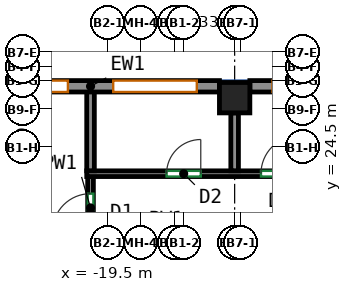
"""IFC4 building model, lengths in metres.
Left out: names, types, materials, properties, quantities, classifications, styles, units other than length and angle.
Written with IfcOpenShell. Run it as: python <this file> out.ifc"""

import sys

from ifc_helpers import new_model, si_unit, direction, frame, frame_2d, origin, origin_2d, place, context, subcontext, project, spatial, rectangle, extrude, source, transform, mapped, element, fill, save


model = new_model("IFC4")
c1 = context("Model", 3, precision=1e-05, world=origin(), true_north=direction((0.0, 1.0)))
c2 = subcontext(c1, "Body", "Model", "MODEL_VIEW")
j1 = project(units=[si_unit("LENGTHUNIT", "METRE"), si_unit("PLANEANGLEUNIT", "RADIAN")], contexts=[c1])
p1 = place(None, origin())
s1 = spatial("IfcSite", under=j1, at=p1, CompositionType="ELEMENT")
p2 = place(p1, origin())
s2 = spatial("IfcBuilding", under=s1, at=p2, CompositionType="ELEMENT")
p3 = place(p2, frame((0.0, 0.0, 171.9)))
s3 = spatial("IfcBuildingStorey", under=s2, at=p3, CompositionType="ELEMENT", Elevation=171.9)
m1 = source(origin(), c2, "Body", "SweptSolid", [
    extrude(rectangle(XDim=0.8, YDim=0.8, at=origin_2d()), origin(), (0.0, 0.0, 1.0), 3.12),
])
p4 = place(p3, frame((-16.167, 25.8, 0.0), z_axis=(0.0, 0.0, 1.0), x_axis=(1.0, 0.0, 0.0)))
e1 = element("IfcColumn", 1, at=p4, inside=s3, PredefinedType="COLUMN", context=c2, shape_type="MappedRepresentation", body=[
    mapped(m1, transform((0.0, 0.0, 0.0))),
])
m2 = source(origin(), c2, "Body", "SweptSolid", [
    extrude(rectangle(XDim=6.783, YDim=0.3, at=frame_2d((3.392, 0.0))), origin(), (0.0, 0.0, 1.0), 3.12),
])
p5 = place(p3, frame((-8.983, 26.1, 0.0), z_axis=(0.0, 0.0, 1.0), x_axis=(-1.0, 0.0, 0.0)))
e2 = element("IfcWall", 2, at=p5, inside=s3, PredefinedType="SOLIDWALL", context=c2, shape_type="MappedRepresentation", body=[
    mapped(m2, transform((0.0, 0.0, 0.0))),
])
p6 = place(p5, frame((0.596, 0.0, 0.85)))
e3 = element("IfcOpeningElement", 3, at=p6, cuts=e2, PredefinedType="OPENING", context=c2, shape_type="SweptSolid", body=[
    extrude(rectangle(XDim=2.2, YDim=1.95, at=frame_2d((1.1, 0.975))), frame((0.0, 0.16, 0.0), z_axis=(0.0, -1.0, 0.0), x_axis=(1.0, 0.0, 0.0)), (0.0, 0.0, 1.0), 0.32),
])
p7 = place(p5, frame((3.988, 0.0, 0.85)))
e4 = element("IfcOpeningElement", 4, at=p7, cuts=e2, PredefinedType="OPENING", context=c2, shape_type="SweptSolid", body=[
    extrude(rectangle(XDim=2.2, YDim=1.95, at=frame_2d((1.1, 0.975))), frame((0.0, 0.16, 0.0), z_axis=(0.0, -1.0, 0.0), x_axis=(1.0, 0.0, 0.0)), (0.0, 0.0, 1.0), 0.32),
])
m3 = source(origin(), c2, "Body", "SweptSolid", [
    extrude(rectangle(XDim=6.783, YDim=0.3, at=frame_2d((3.392, 0.0))), origin(), (0.0, 0.0, 1.0), 3.12),
])
p8 = place(p3, frame((-16.567, 26.1, 0.0), z_axis=(0.0, 0.0, 1.0), x_axis=(-1.0, 0.0, 0.0)))
e5 = element("IfcWall", 5, at=p8, inside=s3, PredefinedType="SOLIDWALL", context=c2, shape_type="MappedRepresentation", body=[
    mapped(m3, transform((0.0, 0.0, 0.0))),
])
p9 = place(p8, frame((0.596, 0.0, 0.85)))
e6 = element("IfcOpeningElement", 6, at=p9, cuts=e5, PredefinedType="OPENING", context=c2, shape_type="SweptSolid", body=[
    extrude(rectangle(XDim=2.2, YDim=1.95, at=frame_2d((1.1, 0.975))), frame((0.0, 0.16, 0.0), z_axis=(0.0, -1.0, 0.0), x_axis=(1.0, 0.0, 0.0)), (0.0, 0.0, 1.0), 0.32),
])
p10 = place(p8, frame((3.988, 0.0, 0.85)))
e7 = element("IfcOpeningElement", 7, at=p10, cuts=e5, PredefinedType="OPENING", context=c2, shape_type="SweptSolid", body=[
    extrude(rectangle(XDim=2.2, YDim=1.95, at=frame_2d((1.1, 0.975))), frame((0.0, 0.16, 0.0), z_axis=(0.0, -1.0, 0.0), x_axis=(1.0, 0.0, 0.0)), (0.0, 0.0, 1.0), 0.32),
])
p11 = place(p3, frame((-19.959, 22.075, 0.0), z_axis=(0.0, 0.0, 1.0), x_axis=(0.0, 1.0, 0.0)))
e8 = element("IfcWall", 8, at=p11, inside=s3, PredefinedType="PARTITIONING", context=c2, shape_type="SweptSolid", body=[
    extrude(rectangle(XDim=1.65, YDim=0.15, at=frame_2d((0.825, 0.0))), origin(), (0.0, 0.0, 1.0), 3.12),
])
p12 = place(p11, frame((0.2, 0.0, 0.0)))
e9 = element("IfcOpeningElement", 9, at=p12, cuts=e8, PredefinedType="OPENING", context=c2, shape_type="SweptSolid", body=[
    extrude(rectangle(XDim=1.0, YDim=2.1, at=frame_2d((0.5, 1.05))), frame((0.0, 0.085, 0.0), z_axis=(0.0, -1.0, 0.0), x_axis=(1.0, 0.0, 0.0)), (0.0, 0.0, 1.0), 0.17),
])
p13 = place(p3, frame((-20.059, 23.8, 0.0), z_axis=(0.0, 0.0, 1.0), x_axis=(1.0, 0.0, 0.0)))
e10 = element("IfcWall", 10, at=p13, inside=s3, PredefinedType="PARTITIONING", context=c2, shape_type="SweptSolid", body=[
    extrude(rectangle(XDim=41.909, YDim=0.15, at=frame_2d((20.955, 0.0))), origin(), (0.0, 0.0, 1.0), 3.12),
])
p14 = place(p13, frame((2.101, 0.0, 0.0)))
e11 = element("IfcOpeningElement", 11, at=p14, cuts=e10, PredefinedType="OPENING", context=c2, shape_type="SweptSolid", body=[
    extrude(rectangle(XDim=0.9, YDim=2.1, at=frame_2d((0.45, 1.05))), frame((0.0, 0.085, 0.0), z_axis=(0.0, -1.0, 0.0), x_axis=(1.0, 0.0, 0.0)), (0.0, 0.0, 1.0), 0.17),
])
p15 = place(p13, frame((4.585, 0.0, 0.0)))
e12 = element("IfcOpeningElement", 12, at=p15, cuts=e10, PredefinedType="OPENING", context=c2, shape_type="SweptSolid", body=[
    extrude(rectangle(XDim=1.0, YDim=2.1, at=frame_2d((0.5, 1.05))), frame((0.0, 0.085, 0.0), z_axis=(0.0, -1.0, 0.0), x_axis=(1.0, 0.0, 0.0)), (0.0, 0.0, 1.0), 0.17),
])
p16 = place(p13, frame((8.175, 0.0, 0.0)))
e13 = element("IfcOpeningElement", 13, at=p16, cuts=e10, PredefinedType="OPENING", context=c2, shape_type="SweptSolid", body=[
    extrude(rectangle(XDim=0.9, YDim=2.1, at=frame_2d((0.45, 1.05))), frame((0.0, 0.085, 0.0), z_axis=(0.0, -1.0, 0.0), x_axis=(1.0, 0.0, 0.0)), (0.0, 0.0, 1.0), 0.17),
])
p17 = place(p13, frame((13.173, 0.0, 0.0)))
e14 = element("IfcOpeningElement", 14, at=p17, cuts=e10, PredefinedType="OPENING", context=c2, shape_type="SweptSolid", body=[
    extrude(rectangle(XDim=1.0, YDim=2.1, at=frame_2d((0.5, 1.05))), frame((0.0, 0.085, 0.0), z_axis=(0.0, -1.0, 0.0), x_axis=(1.0, 0.0, 0.0)), (0.0, 0.0, 1.0), 0.17),
])
p18 = place(p13, frame((15.658, 0.0, 0.0)))
e15 = element("IfcOpeningElement", 15, at=p18, cuts=e10, PredefinedType="OPENING", context=c2, shape_type="SweptSolid", body=[
    extrude(rectangle(XDim=0.9, YDim=2.1, at=frame_2d((0.45, 1.05))), frame((0.0, 0.085, 0.0), z_axis=(0.0, -1.0, 0.0), x_axis=(1.0, 0.0, 0.0)), (0.0, 0.0, 1.0), 0.17),
])
p19 = place(p13, frame((21.315, 0.0, 0.0)))
e16 = element("IfcOpeningElement", 16, at=p19, cuts=e10, PredefinedType="OPENING", context=c2, shape_type="SweptSolid", body=[
    extrude(rectangle(XDim=0.9, YDim=2.1, at=frame_2d((0.45, 1.05))), frame((0.0, 0.085, 0.0), z_axis=(0.0, -1.0, 0.0), x_axis=(1.0, 0.0, 0.0)), (0.0, 0.0, 1.0), 0.17),
])
p20 = place(p13, frame((24.625, 0.0, 0.0)))
e17 = element("IfcOpeningElement", 17, at=p20, cuts=e10, PredefinedType="OPENING", context=c2, shape_type="SweptSolid", body=[
    extrude(rectangle(XDim=1.0, YDim=2.1, at=frame_2d((0.5, 1.05))), frame((0.0, 0.085, 0.0), z_axis=(0.0, -1.0, 0.0), x_axis=(1.0, 0.0, 0.0)), (0.0, 0.0, 1.0), 0.17),
])
p21 = place(p13, frame((29.043, 0.0, 0.0)))
e18 = element("IfcOpeningElement", 18, at=p21, cuts=e10, PredefinedType="OPENING", context=c2, shape_type="SweptSolid", body=[
    extrude(rectangle(XDim=0.9, YDim=2.1, at=frame_2d((0.45, 1.05))), frame((0.0, 0.085, 0.0), z_axis=(0.0, -1.0, 0.0), x_axis=(1.0, 0.0, 0.0)), (0.0, 0.0, 1.0), 0.17),
])
p22 = place(p13, frame((32.735, 0.0, 0.0)))
e19 = element("IfcOpeningElement", 19, at=p22, cuts=e10, PredefinedType="OPENING", context=c2, shape_type="SweptSolid", body=[
    extrude(rectangle(XDim=1.0, YDim=2.1, at=frame_2d((0.5, 1.05))), frame((0.0, 0.085, 0.0), z_axis=(0.0, -1.0, 0.0), x_axis=(1.0, 0.0, 0.0)), (0.0, 0.0, 1.0), 0.17),
])
p23 = place(p13, frame((36.627, 0.0, 0.0)))
e20 = element("IfcOpeningElement", 20, at=p23, cuts=e10, PredefinedType="OPENING", context=c2, shape_type="SweptSolid", body=[
    extrude(rectangle(XDim=0.9, YDim=2.1, at=frame_2d((0.45, 1.05))), frame((0.0, 0.085, 0.0), z_axis=(0.0, -1.0, 0.0), x_axis=(1.0, 0.0, 0.0)), (0.0, 0.0, 1.0), 0.17),
])
p24 = place(p13, frame((38.808, 0.0, 0.0)))
e21 = element("IfcOpeningElement", 21, at=p24, cuts=e10, PredefinedType="OPENING", context=c2, shape_type="SweptSolid", body=[
    extrude(rectangle(XDim=0.9, YDim=2.1, at=frame_2d((0.45, 1.05))), frame((0.0, 0.085, 0.0), z_axis=(0.0, -1.0, 0.0), x_axis=(1.0, 0.0, 0.0)), (0.0, 0.0, 1.0), 0.17),
])
p25 = place(p3, frame((-19.959, 23.877, 0.0), z_axis=(0.0, 0.0, 1.0), x_axis=(0.0, 1.0, 0.0)))
e22 = element("IfcWall", 22, at=p25, inside=s3, PredefinedType="PARTITIONING", context=c2, shape_type="SweptSolid", body=[
    extrude(rectangle(XDim=2.123, YDim=0.2, at=frame_2d((1.062, 0.0))), origin(), (0.0, 0.0, 1.0), 3.12),
])
p26 = place(p3, frame((-16.167, 23.877, 0.0), z_axis=(0.0, 0.0, 1.0), x_axis=(0.0, 1.0, 0.0)))
e23 = element("IfcWall", 23, at=p26, inside=s3, PredefinedType="PARTITIONING", context=c2, shape_type="SweptSolid", body=[
    extrude(rectangle(XDim=1.523, YDim=0.2, at=frame_2d((0.761, 0.0))), origin(), (0.0, 0.0, 1.0), 3.12),
])
p27 = place(p7, origin())
e24 = element("IfcWindow", 24, at=p27, inside=s3, PartitioningType="SINGLE_PANEL", PredefinedType="WINDOW", context=c2, shape_type="SweptSolid", body=[
    extrude(rectangle(XDim=2.2, YDim=1.95, at=frame_2d((1.1, 0.975))), frame((0.0, 0.03, 0.0), z_axis=(0.0, -1.0, 0.0), x_axis=(1.0, 0.0, 0.0)), (0.0, 0.0, 1.0), 0.06),
])
fill(e4, e24)
p28 = place(p9, origin())
e25 = element("IfcWindow", 25, at=p28, inside=s3, PartitioningType="SINGLE_PANEL", PredefinedType="WINDOW", context=c2, shape_type="SweptSolid", body=[
    extrude(rectangle(XDim=2.2, YDim=1.95, at=frame_2d((1.1, 0.975))), frame((0.0, 0.03, 0.0), z_axis=(0.0, -1.0, 0.0), x_axis=(1.0, 0.0, 0.0)), (0.0, 0.0, 1.0), 0.06),
])
fill(e6, e25)
p29 = place(p10, origin())
e26 = element("IfcWindow", 26, at=p29, inside=s3, PartitioningType="SINGLE_PANEL", PredefinedType="WINDOW", context=c2, shape_type="SweptSolid", body=[
    extrude(rectangle(XDim=2.2, YDim=1.95, at=frame_2d((1.1, 0.975))), frame((0.0, 0.03, 0.0), z_axis=(0.0, -1.0, 0.0), x_axis=(1.0, 0.0, 0.0)), (0.0, 0.0, 1.0), 0.06),
])
fill(e7, e26)
p30 = place(p12, origin())
e27 = element("IfcDoor", 27, at=p30, inside=s3, OperationType="SINGLE_SWING_LEFT", PredefinedType="DOOR", context=c2, shape_type="SweptSolid", body=[
    extrude(rectangle(XDim=1.0, YDim=2.1, at=frame_2d((0.5, 1.05))), frame((0.0, 0.025, 0.0), z_axis=(0.0, -1.0, 0.0), x_axis=(1.0, 0.0, 0.0)), (0.0, 0.0, 1.0), 0.05),
])
fill(e9, e27)
p31 = place(p14, origin())
e28 = element("IfcDoor", 28, at=p31, inside=s3, OperationType="SINGLE_SWING_RIGHT", PredefinedType="DOOR", context=c2, shape_type="SweptSolid", body=[
    extrude(rectangle(XDim=0.9, YDim=2.1, at=frame_2d((0.45, 1.05))), frame((0.0, 0.025, 0.0), z_axis=(0.0, -1.0, 0.0), x_axis=(1.0, 0.0, 0.0)), (0.0, 0.0, 1.0), 0.05),
])
fill(e11, e28)
p32 = place(p15, origin())
e29 = element("IfcDoor", 29, at=p32, inside=s3, OperationType="SINGLE_SWING_RIGHT", PredefinedType="DOOR", context=c2, shape_type="SweptSolid", body=[
    extrude(rectangle(XDim=1.0, YDim=2.1, at=frame_2d((0.5, 1.05))), frame((0.0, 0.025, 0.0), z_axis=(0.0, -1.0, 0.0), x_axis=(1.0, 0.0, 0.0)), (0.0, 0.0, 1.0), 0.05),
])
fill(e12, e29)
save(model, sys.argv[1])
